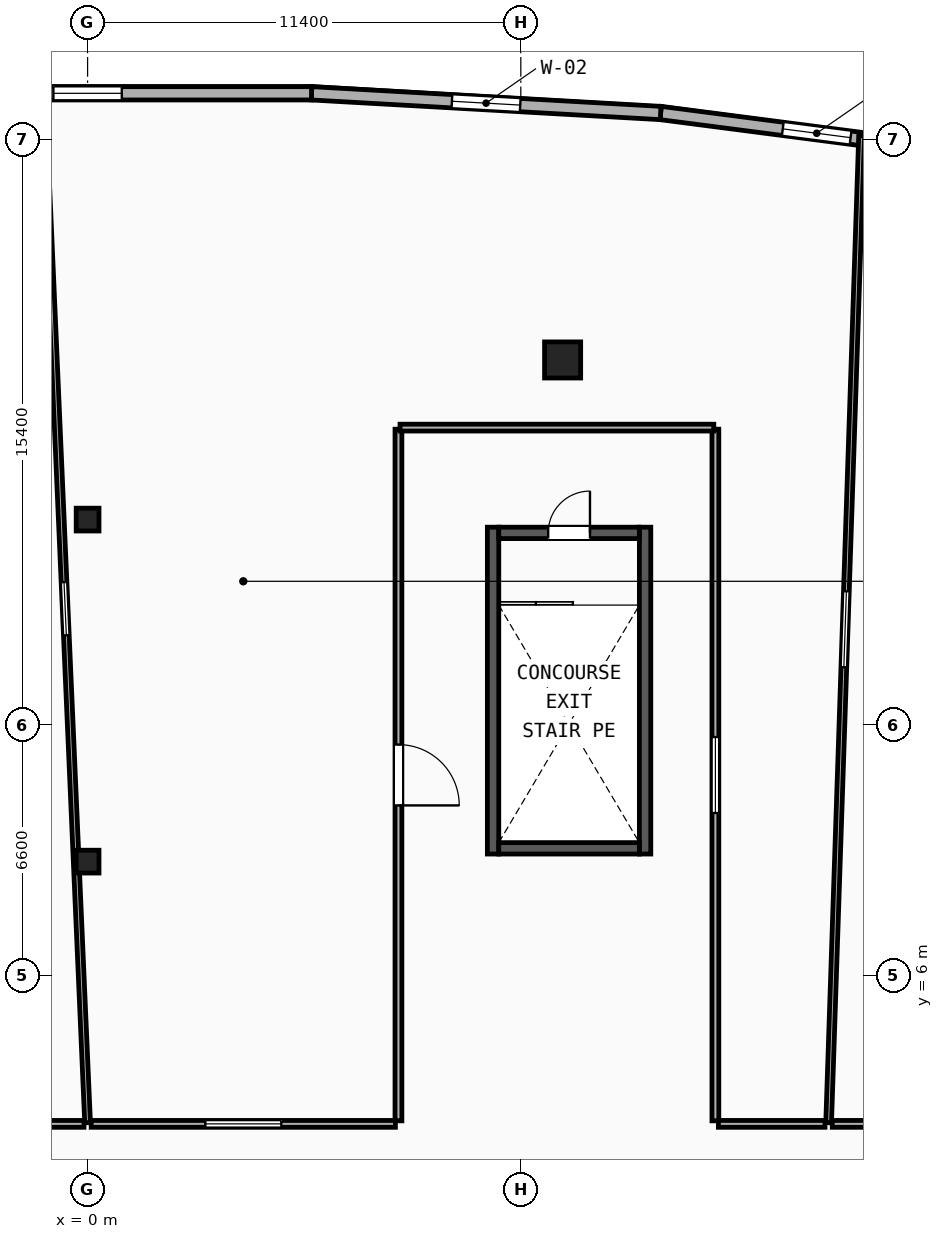
"""IFC4 building model, lengths in metres.
Left out: names, types, materials, properties, quantities, classifications, styles, units other than length and angle.
Written with IfcOpenShell. Run it as: python <this file> out.ifc"""

import sys

from ifc_helpers import new_model, si_unit, direction, frame, frame_2d, origin, origin_2d, place, context, subcontext, project, spatial, rectangle, hollow_rectangle, circle, extrude, element, fill, save


model = new_model("IFC4")
c1 = context("Model", 3, precision=1e-05, world=origin(), true_north=direction((0.0, 1.0)))
c2 = subcontext(c1, "Body", "Model", "MODEL_VIEW")
j1 = project(units=[si_unit("LENGTHUNIT", "METRE"), si_unit("PLANEANGLEUNIT", "RADIAN")], contexts=[c1])
p1 = place(None, origin())
s1 = spatial("IfcSite", under=j1, at=p1, CompositionType="ELEMENT")
p2 = place(p1, origin())
s2 = spatial("IfcBuilding", under=s1, at=p2, CompositionType="ELEMENT")
p3 = place(p2, frame((0.0, 0.0, 20.0)))
s3 = spatial("IfcBuildingStorey", under=s2, at=p3, CompositionType="ELEMENT", Elevation=20.0)
for number, where, z_axis, x_axis in (
    (1, (0.0, 9.0, 0.0), (0.0, 0.0, 1.0), (1.0, 0.0, 0.0)),
    (2, (0.0, 18.0, 0.0), (0.0, 0.0, 1.0), (1.0, 0.0, 0.0)),
):
    element("IfcColumn", number, at=place(p3, frame(where, z_axis=z_axis, x_axis=x_axis)), inside=s3, PredefinedType="COLUMN", context=c2, shape_type="SweptSolid", body=[
        extrude(hollow_rectangle(XDim=0.6, YDim=0.6, WallThickness=0.032, at=origin_2d()), origin(), (0.0, 0.0, 1.0), 3.695),
    ])
p4 = place(p3, frame((12.5, 22.2, 0.0), z_axis=(0.0, 0.0, 1.0), x_axis=(1.0, 0.0, 0.0)))
e3 = element("IfcColumn", 3, at=p4, inside=s3, PredefinedType="PILASTER", context=c2, shape_type="SweptSolid", body=[
    extrude(circle(Radius=0.475, at=origin_2d()), origin(), (0.0, 0.0, 1.0), 3.695),
])
p5 = place(p3, frame((23.293, 27.632, 0.0), z_axis=(0.0, 0.0, 1.0), x_axis=(-0.99168663472, 0.128676410104, 0.0)))
e4 = element("IfcWall", 4, at=p5, inside=s3, PredefinedType="SOLIDWALL", context=c2, shape_type="SweptSolid", body=[
    extrude(rectangle(XDim=8.284, YDim=0.35, at=frame_2d((4.142, 0.0))), origin(), (0.0, 0.0, 1.0), 3.7),
])
p6 = place(p5, frame((3.242, 0.0, 0.45)))
e5 = element("IfcOpeningElement", 5, at=p6, cuts=e4, PredefinedType="OPENING", context=c2, shape_type="SweptSolid", body=[
    extrude(rectangle(XDim=1.8, YDim=2.4, at=frame_2d((0.9, 1.2))), frame((0.0, 0.185, 0.0), z_axis=(0.0, -1.0, 0.0), x_axis=(1.0, 0.0, 0.0)), (0.0, 0.0, 1.0), 0.37),
])
p7 = place(p3, frame((15.079, 28.698, 0.0), z_axis=(0.0, 0.0, 1.0), x_axis=(-0.998413463137, 0.056307695976, 0.0)))
e6 = element("IfcWall", 6, at=p7, inside=s3, PredefinedType="SOLIDWALL", context=c2, shape_type="SweptSolid", body=[
    extrude(rectangle(XDim=9.201, YDim=0.35, at=frame_2d((4.6, 0.0))), origin(), (0.0, 0.0, 1.0), 3.7),
])
p8 = place(p7, frame((3.7, 0.0, 0.45)))
e7 = element("IfcOpeningElement", 7, at=p8, cuts=e6, PredefinedType="OPENING", context=c2, shape_type="SweptSolid", body=[
    extrude(rectangle(XDim=1.8, YDim=2.4, at=frame_2d((0.9, 1.2))), frame((0.0, 0.185, 0.0), z_axis=(0.0, -1.0, 0.0), x_axis=(1.0, 0.0, 0.0)), (0.0, 0.0, 1.0), 0.37),
])
p9 = place(p3, frame((5.893, 29.216, 0.0), z_axis=(0.0, 0.0, 1.0), x_axis=(-1.0, 0.0, 0.0)))
e8 = element("IfcWall", 8, at=p9, inside=s3, PredefinedType="SOLIDWALL", context=c2, shape_type="SweptSolid", body=[
    extrude(rectangle(XDim=11.785, YDim=0.35, at=frame_2d((5.893, 0.0))), origin(), (0.0, 0.0, 1.0), 3.7),
])
p10 = place(p9, frame((4.992, 0.0, 0.45)))
e9 = element("IfcOpeningElement", 9, at=p10, cuts=e8, PredefinedType="OPENING", context=c2, shape_type="SweptSolid", body=[
    extrude(rectangle(XDim=1.8, YDim=2.4, at=frame_2d((0.9, 1.2))), frame((0.0, 0.185, 0.0), z_axis=(0.0, -1.0, 0.0), x_axis=(1.0, 0.0, 0.0)), (0.0, 0.0, 1.0), 0.37),
])
for number, where, z_axis, x_axis in (
    (10, (10.67, 9.2, 0.0), (0.0, 0.0, 1.0), (0.0, 1.0, 0.0)),
    (11, (14.67, 9.2, 0.0), (0.0, 0.0, 1.0), (0.0, 1.0, 0.0)),
):
    element("IfcWall", number, at=place(p3, frame(where, z_axis=z_axis, x_axis=x_axis)), inside=s3, PredefinedType="SHEAR", context=c2, shape_type="SweptSolid", body=[
        extrude(rectangle(XDim=8.6, YDim=0.3, at=frame_2d((4.3, 0.0))), origin(), (0.0, 0.0, 1.0), 3.7),
    ])
p11 = place(p3, frame((10.82, 17.65, 0.0), z_axis=(0.0, 0.0, 1.0), x_axis=(1.0, 0.0, 0.0)))
e12 = element("IfcWall", 12, at=p11, inside=s3, PredefinedType="SHEAR", context=c2, shape_type="SweptSolid", body=[
    extrude(rectangle(XDim=3.7, YDim=0.3, at=frame_2d((1.85, 0.0))), origin(), (0.0, 0.0, 1.0), 3.7),
])
p12 = place(p11, frame((1.3, 0.0, 0.0)))
e13 = element("IfcOpeningElement", 13, at=p12, cuts=e12, PredefinedType="OPENING", context=c2, shape_type="SweptSolid", body=[
    extrude(rectangle(XDim=1.1, YDim=2.15, at=frame_2d((0.55, 1.075))), frame((0.0, 0.16, 0.0), z_axis=(0.0, -1.0, 0.0), x_axis=(1.0, 0.0, 0.0)), (0.0, 0.0, 1.0), 0.32),
])
p13 = place(p3, frame((10.82, 9.35, 0.0), z_axis=(0.0, 0.0, 1.0), x_axis=(1.0, 0.0, 0.0)))
e14 = element("IfcWall", 14, at=p13, inside=s3, PredefinedType="SHEAR", context=c2, shape_type="SweptSolid", body=[
    extrude(rectangle(XDim=3.7, YDim=0.3, at=frame_2d((1.85, 0.0))), origin(), (0.0, 0.0, 1.0), 3.7),
])
p14 = place(p3, frame((0.0, 2.13, 0.0), z_axis=(0.0, 0.0, 1.0), x_axis=(-0.043560875221, 0.999050774561, 0.0)))
e15 = element("IfcWall", 15, at=p14, inside=s3, PredefinedType="PARTITIONING", context=c2, shape_type="SweptSolid", body=[
    extrude(rectangle(XDim=27.076, YDim=0.15, at=frame_2d((13.538, 0.0))), origin(), (0.0, 0.0, 1.0), 2.922),
])
p15 = place(p14, frame((12.838, 0.0, 1.05)))
e16 = element("IfcOpeningElement", 16, at=p15, cuts=e15, PredefinedType="OPENING", context=c2, shape_type="SweptSolid", body=[
    extrude(rectangle(XDim=1.4, YDim=1.5, at=frame_2d((0.7, 0.75))), frame((0.0, 0.085, 0.0), z_axis=(0.0, -1.0, 0.0), x_axis=(1.0, 0.0, 0.0)), (0.0, 0.0, 1.0), 0.17),
])
p16 = place(p3, frame((19.5, 2.13, 0.0), z_axis=(0.0, 0.0, 1.0), x_axis=(0.033375525231, 0.999442881968, 0.0)))
e17 = element("IfcWall", 17, at=p16, inside=s3, PredefinedType="PARTITIONING", context=c2, shape_type="SweptSolid", body=[
    extrude(rectangle(XDim=25.983, YDim=0.15, at=frame_2d((12.991, 0.0))), origin(), (0.0, 0.0, 1.0), 3.7),
])
p17 = place(p16, frame((11.991, 0.0, 1.05)))
e18 = element("IfcOpeningElement", 18, at=p17, cuts=e17, PredefinedType="OPENING", context=c2, shape_type="SweptSolid", body=[
    extrude(rectangle(XDim=2.0, YDim=1.5, at=frame_2d((1.0, 0.75))), frame((0.0, 0.085, 0.0), z_axis=(0.0, -1.0, 0.0), x_axis=(1.0, 0.0, 0.0)), (0.0, 0.0, 1.0), 0.17),
])
p18 = place(p3, frame((35.479, 2.1, 0.0), z_axis=(0.0, 0.0, 1.0), x_axis=(-1.0, 0.0, 0.0)))
e19 = element("IfcWall", 19, at=p18, inside=s3, PredefinedType="PARTITIONING", context=c2, shape_type="SweptSolid", body=[
    extrude(rectangle(XDim=15.884, YDim=0.18, at=frame_2d((7.942, 0.0))), origin(), (0.0, 0.0, 1.0), 3.7),
])
p19 = place(p18, frame((7.142, 0.0, 0.0)))
e20 = element("IfcOpeningElement", 20, at=p19, cuts=e19, PredefinedType="OPENING", context=c2, shape_type="SweptSolid", body=[
    extrude(rectangle(XDim=1.6, YDim=2.2, at=frame_2d((0.8, 1.1))), frame((0.0, 0.1, 0.0), z_axis=(0.0, -1.0, 0.0), x_axis=(1.0, 0.0, 0.0)), (0.0, 0.0, 1.0), 0.2),
])
p20 = place(p3, frame((-0.095, 2.1, 0.0), z_axis=(0.0, 0.0, 1.0), x_axis=(-1.0, 0.0, 0.0)))
e21 = element("IfcWall", 21, at=p20, inside=s3, PredefinedType="PARTITIONING", context=c2, shape_type="SweptSolid", body=[
    extrude(rectangle(XDim=16.945, YDim=0.18, at=frame_2d((8.473, 0.0))), origin(), (0.0, 0.0, 1.0), 2.922),
])
p21 = place(p20, frame((7.673, 0.0, 0.0)))
e22 = element("IfcOpeningElement", 22, at=p21, cuts=e21, PredefinedType="OPENING", context=c2, shape_type="SweptSolid", body=[
    extrude(rectangle(XDim=1.6, YDim=2.2, at=frame_2d((0.8, 1.1))), frame((0.0, 0.1, 0.0), z_axis=(0.0, -1.0, 0.0), x_axis=(1.0, 0.0, 0.0)), (0.0, 0.0, 1.0), 0.2),
])
p22 = place(p3, frame((8.18, 20.378, 0.0), z_axis=(0.0, 0.0, 1.0), x_axis=(0.0, -1.0, 0.0)))
e23 = element("IfcWall", 23, at=p22, inside=s3, PredefinedType="PARTITIONING", context=c2, shape_type="SweptSolid", body=[
    extrude(rectangle(XDim=18.198, YDim=0.18, at=frame_2d((9.099, 0.0))), origin(), (0.0, 0.0, 1.0), 3.7),
])
p23 = place(p22, frame((8.299, 0.0, 0.0)))
e24 = element("IfcOpeningElement", 24, at=p23, cuts=e23, PredefinedType="OPENING", context=c2, shape_type="SweptSolid", body=[
    extrude(rectangle(XDim=1.6, YDim=2.2, at=frame_2d((0.8, 1.1))), frame((0.0, 0.1, 0.0), z_axis=(0.0, -1.0, 0.0), x_axis=(1.0, 0.0, 0.0)), (0.0, 0.0, 1.0), 0.2),
])
p24 = place(p3, frame((16.52, 2.18, 0.0), z_axis=(0.0, 0.0, 1.0), x_axis=(0.0, 1.0, 0.0)))
e25 = element("IfcWall", 25, at=p24, inside=s3, PredefinedType="PARTITIONING", context=c2, shape_type="SweptSolid", body=[
    extrude(rectangle(XDim=18.198, YDim=0.18, at=frame_2d((9.099, 0.0))), origin(), (0.0, 0.0, 1.0), 3.7),
])
p25 = place(p24, frame((8.099, 0.0, 1.05)))
e26 = element("IfcOpeningElement", 26, at=p25, cuts=e25, PredefinedType="OPENING", context=c2, shape_type="SweptSolid", body=[
    extrude(rectangle(XDim=2.0, YDim=1.5, at=frame_2d((1.0, 0.75))), frame((0.0, 0.1, 0.0), z_axis=(0.0, -1.0, 0.0), x_axis=(1.0, 0.0, 0.0)), (0.0, 0.0, 1.0), 0.2),
])
p26 = place(p3, frame((16.479, 20.42, 0.0), z_axis=(0.0, 0.0, 1.0), x_axis=(-1.0, 0.0, 0.0)))
e27 = element("IfcWall", 27, at=p26, inside=s3, PredefinedType="PARTITIONING", context=c2, shape_type="SweptSolid", body=[
    extrude(rectangle(XDim=8.257, YDim=0.18, at=frame_2d((4.128, 0.0))), origin(), (0.0, 0.0, 1.0), 3.7),
])
p27 = place(p3, frame((8.1, 2.1, 0.0), z_axis=(0.0, 0.0, 1.0), x_axis=(-1.0, 0.0, 0.0)))
e28 = element("IfcWall", 28, at=p27, inside=s3, PredefinedType="PARTITIONING", context=c2, shape_type="SweptSolid", body=[
    extrude(rectangle(XDim=8.005, YDim=0.18, at=frame_2d((4.002, 0.0))), origin(), (0.0, 0.0, 1.0), 3.7),
])
p28 = place(p27, frame((3.002, 0.0, 1.05)))
e29 = element("IfcOpeningElement", 29, at=p28, cuts=e28, PredefinedType="OPENING", context=c2, shape_type="SweptSolid", body=[
    extrude(rectangle(XDim=2.0, YDim=1.5, at=frame_2d((1.0, 0.75))), frame((0.0, 0.1, 0.0), z_axis=(0.0, -1.0, 0.0), x_axis=(1.0, 0.0, 0.0)), (0.0, 0.0, 1.0), 0.2),
])
p29 = place(p3, frame((19.405, 2.1, 0.0), z_axis=(0.0, 0.0, 1.0), x_axis=(-1.0, 0.0, 0.0)))
e30 = element("IfcWall", 30, at=p29, inside=s3, PredefinedType="PARTITIONING", context=c2, shape_type="SweptSolid", body=[
    extrude(rectangle(XDim=2.805, YDim=0.18, at=frame_2d((1.402, 0.0))), origin(), (0.0, 0.0, 1.0), 3.7),
])
p30 = place(p6, origin())
e31 = element("IfcWindow", 31, at=p30, inside=s3, PartitioningType="SINGLE_PANEL", PredefinedType="WINDOW", context=c2, shape_type="SweptSolid", body=[
    extrude(rectangle(XDim=1.8, YDim=2.4, at=frame_2d((0.9, 1.2))), frame((0.0, 0.03, 0.0), z_axis=(0.0, -1.0, 0.0), x_axis=(1.0, 0.0, 0.0)), (0.0, 0.0, 1.0), 0.06),
])
fill(e5, e31)
p31 = place(p8, origin())
e32 = element("IfcWindow", 32, at=p31, inside=s3, PartitioningType="SINGLE_PANEL", PredefinedType="WINDOW", context=c2, shape_type="SweptSolid", body=[
    extrude(rectangle(XDim=1.8, YDim=2.4, at=frame_2d((0.9, 1.2))), frame((0.0, 0.03, 0.0), z_axis=(0.0, -1.0, 0.0), x_axis=(1.0, 0.0, 0.0)), (0.0, 0.0, 1.0), 0.06),
])
fill(e7, e32)
p32 = place(p10, origin())
e33 = element("IfcWindow", 33, at=p32, inside=s3, PartitioningType="SINGLE_PANEL", PredefinedType="WINDOW", context=c2, shape_type="SweptSolid", body=[
    extrude(rectangle(XDim=1.8, YDim=2.4, at=frame_2d((0.9, 1.2))), frame((0.0, 0.03, 0.0), z_axis=(0.0, -1.0, 0.0), x_axis=(1.0, 0.0, 0.0)), (0.0, 0.0, 1.0), 0.06),
])
fill(e9, e33)
p33 = place(p12, origin())
e34 = element("IfcDoor", 34, at=p33, inside=s3, OperationType="SINGLE_SWING_RIGHT", PredefinedType="DOOR", context=c2, shape_type="SweptSolid", body=[
    extrude(rectangle(XDim=1.1, YDim=2.15, at=frame_2d((0.55, 1.075))), frame((0.0, 0.025, 0.0), z_axis=(0.0, -1.0, 0.0), x_axis=(1.0, 0.0, 0.0)), (0.0, 0.0, 1.0), 0.05),
])
fill(e13, e34)
p34 = place(p23, origin())
e35 = element("IfcDoor", 35, at=p34, inside=s3, OperationType="SINGLE_SWING_RIGHT", PredefinedType="DOOR", context=c2, shape_type="SweptSolid", body=[
    extrude(rectangle(XDim=1.6, YDim=2.2, at=frame_2d((0.8, 1.1))), frame((0.0, 0.025, 0.0), z_axis=(0.0, -1.0, 0.0), x_axis=(1.0, 0.0, 0.0)), (0.0, 0.0, 1.0), 0.05),
])
fill(e24, e35)
p35 = place(p15, origin())
e36 = element("IfcWindow", 36, at=p35, inside=s3, PartitioningType="SINGLE_PANEL", PredefinedType="WINDOW", context=c2, shape_type="SweptSolid", body=[
    extrude(rectangle(XDim=1.4, YDim=1.5, at=frame_2d((0.7, 0.75))), frame((0.0, 0.03, 0.0), z_axis=(0.0, -1.0, 0.0), x_axis=(1.0, 0.0, 0.0)), (0.0, 0.0, 1.0), 0.06),
])
fill(e16, e36)
p36 = place(p17, origin())
e37 = element("IfcWindow", 37, at=p36, inside=s3, PartitioningType="SINGLE_PANEL", PredefinedType="WINDOW", context=c2, shape_type="SweptSolid", body=[
    extrude(rectangle(XDim=2.0, YDim=1.5, at=frame_2d((1.0, 0.75))), frame((0.0, 0.03, 0.0), z_axis=(0.0, -1.0, 0.0), x_axis=(1.0, 0.0, 0.0)), (0.0, 0.0, 1.0), 0.06),
])
fill(e18, e37)
p37 = place(p25, origin())
e38 = element("IfcWindow", 38, at=p37, inside=s3, PartitioningType="SINGLE_PANEL", PredefinedType="WINDOW", context=c2, shape_type="SweptSolid", body=[
    extrude(rectangle(XDim=2.0, YDim=1.5, at=frame_2d((1.0, 0.75))), frame((0.0, 0.03, 0.0), z_axis=(0.0, -1.0, 0.0), x_axis=(1.0, 0.0, 0.0)), (0.0, 0.0, 1.0), 0.06),
])
fill(e26, e38)
p38 = place(p28, origin())
e39 = element("IfcWindow", 39, at=p38, inside=s3, PartitioningType="SINGLE_PANEL", PredefinedType="WINDOW", context=c2, shape_type="SweptSolid", body=[
    extrude(rectangle(XDim=2.0, YDim=1.5, at=frame_2d((1.0, 0.75))), frame((0.0, 0.03, 0.0), z_axis=(0.0, -1.0, 0.0), x_axis=(1.0, 0.0, 0.0)), (0.0, 0.0, 1.0), 0.06),
])
fill(e29, e39)
save(model, sys.argv[1])
